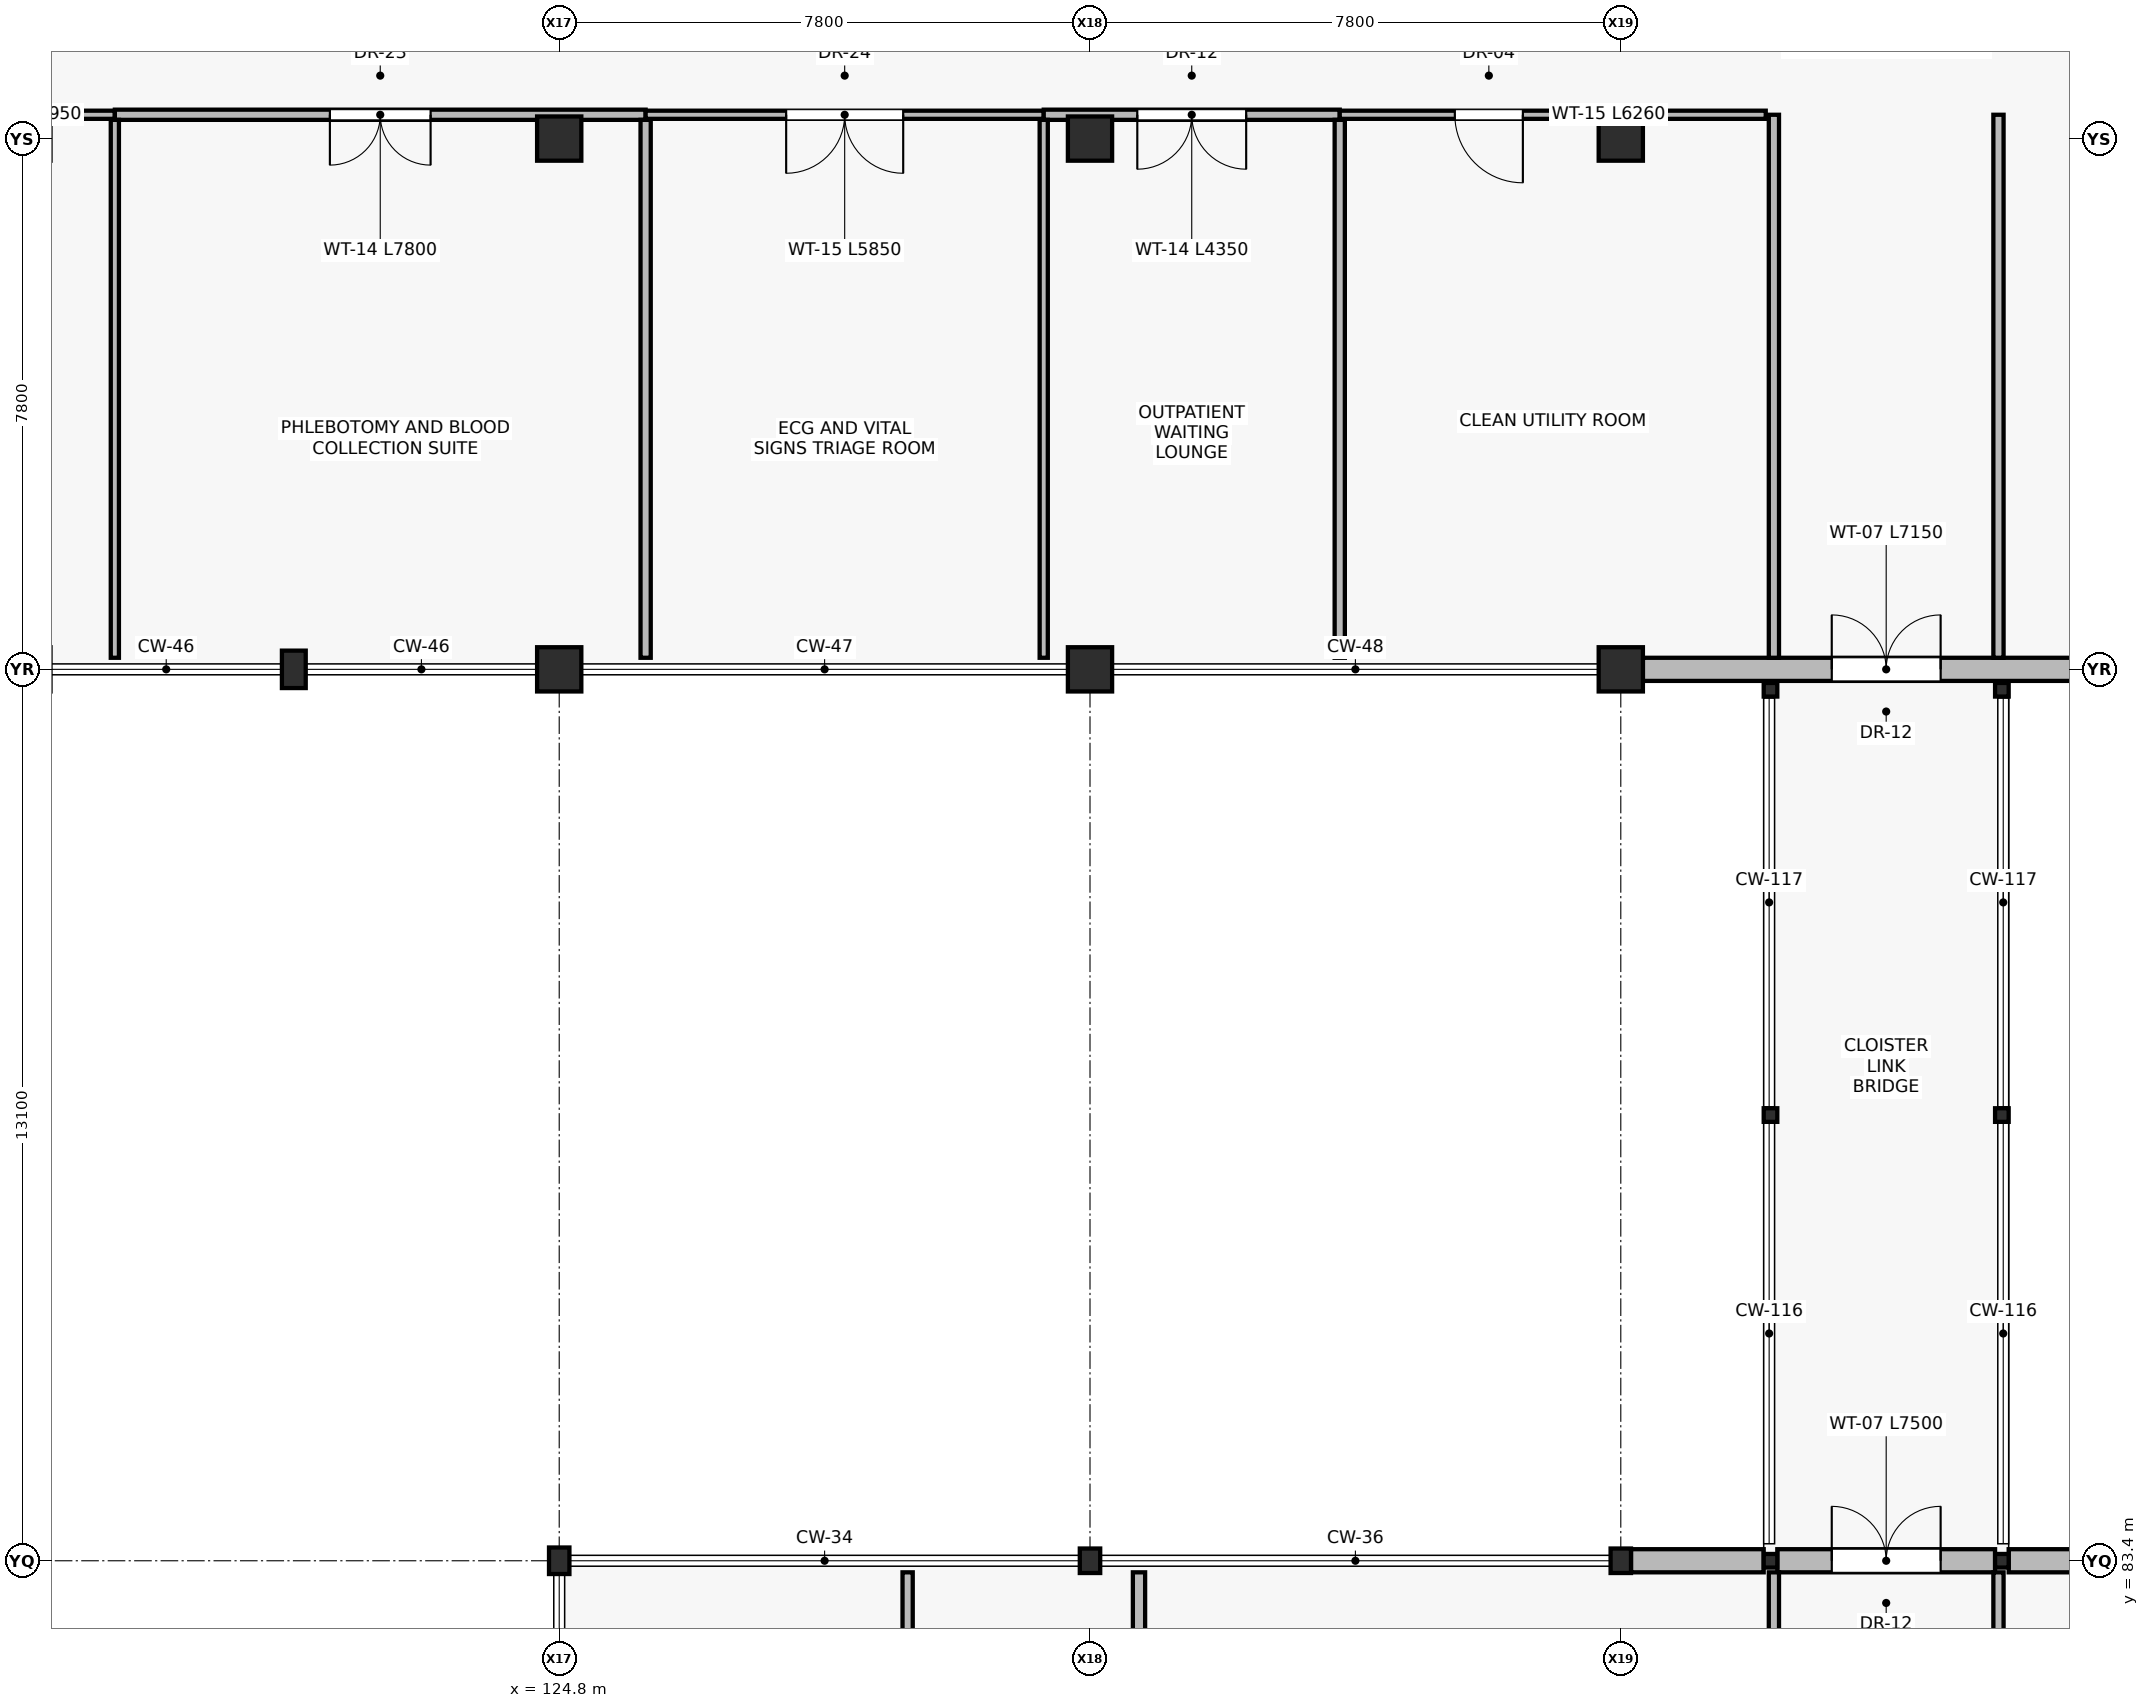
"""IFC4 building model, lengths in metres.
Left out: names, types, materials, properties, quantities, classifications, styles, units other than length and angle.
Written with IfcOpenShell. Run it as: python <this file> out.ifc"""

import sys

from ifc_helpers import new_model, si_unit, direction, frame, frame_2d, origin, origin_2d, place, context, subcontext, project, spatial, rectangle, hollow_rectangle, i_section, extrude, element, fill, save


model = new_model("IFC4")
c1 = context("Model", 3, precision=1e-05, world=origin(), true_north=direction((0.0, 1.0)))
c2 = subcontext(c1, "Body", "Model", "MODEL_VIEW")
j1 = project(units=[si_unit("LENGTHUNIT", "METRE"), si_unit("PLANEANGLEUNIT", "RADIAN")], contexts=[c1])
p1 = place(None, origin())
s1 = spatial("IfcSite", under=j1, at=p1, CompositionType="ELEMENT")
p2 = place(p1, origin())
s2 = spatial("IfcBuilding", under=s1, at=p2, CompositionType="ELEMENT")
p3 = place(p2, origin())
s3 = spatial("IfcBuildingStorey", under=s2, at=p3, CompositionType="ELEMENT", Elevation=0.0)
p4 = place(p3, frame((124.8, 83.4, 0.0), z_axis=(0.0, 0.0, 1.0), x_axis=(1.0, 0.0, 0.0)))
e1 = element("IfcColumn", 1, at=p4, inside=s3, PredefinedType="COLUMN", context=c2, shape_type="SweptSolid", body=[
    extrude(i_section(OverallWidth=0.3, OverallDepth=0.39, WebThickness=0.011, FlangeThickness=0.019, at=origin_2d()), origin(), (0.0, 0.0, 1.0), 4.8),
])
for number, where, z_axis, x_axis in (
    (2, (132.6, 83.4, 0.0), (0.0, 0.0, 1.0), (1.0, 0.0, 0.0)),
    (3, (140.4, 83.4, 0.0), (0.0, 0.0, 1.0), (1.0, 0.0, 0.0)),
):
    element("IfcColumn", number, at=place(p3, frame(where, z_axis=z_axis, x_axis=x_axis)), inside=s3, PredefinedType="COLUMN", context=c2, shape_type="SweptSolid", body=[
        extrude(i_section(OverallWidth=0.3, OverallDepth=0.36, WebThickness=0.012, FlangeThickness=0.022, at=origin_2d()), origin(), (0.0, 0.0, 1.0), 4.8),
    ])
for number, where, z_axis, x_axis in (
    (4, (124.8, 96.5, 0.0), (0.0, 0.0, 1.0), (1.0, 0.0, 0.0)),
    (5, (124.8, 104.3, 0.0), (0.0, 0.0, 1.0), (1.0, 0.0, 0.0)),
    (6, (132.6, 96.5, 0.0), (0.0, 0.0, 1.0), (1.0, 0.0, 0.0)),
    (7, (132.6, 104.3, 0.0), (0.0, 0.0, 1.0), (1.0, 0.0, 0.0)),
    (8, (140.4, 96.5, 0.0), (0.0, 0.0, 1.0), (1.0, 0.0, 0.0)),
    (9, (140.4, 104.3, 0.0), (0.0, 0.0, 1.0), (1.0, 0.0, 0.0)),
):
    element("IfcColumn", number, at=place(p3, frame(where, z_axis=z_axis, x_axis=x_axis)), inside=s3, PredefinedType="COLUMN", context=c2, shape_type="SweptSolid", body=[
        extrude(rectangle(XDim=0.65, YDim=0.65, at=origin_2d()), origin(), (0.0, 0.0, 1.0), 4.8),
    ])
for number, where, z_axis, x_axis in (
    (10, (142.6, 83.4, 0.0), (0.0, 0.0, 1.0), (1.0, 0.0, 0.0)),
    (11, (146.0, 83.4, 0.0), (0.0, 0.0, 1.0), (1.0, 0.0, 0.0)),
    (12, (142.6, 89.95, 0.0), (0.0, 0.0, 1.0), (1.0, 0.0, 0.0)),
    (13, (146.0, 89.95, 0.0), (0.0, 0.0, 1.0), (1.0, 0.0, 0.0)),
    (14, (142.6, 96.2, 0.0), (0.0, 0.0, 1.0), (1.0, 0.0, 0.0)),
    (15, (146.0, 96.2, 0.0), (0.0, 0.0, 1.0), (1.0, 0.0, 0.0)),
):
    element("IfcColumn", number, at=place(p3, frame(where, z_axis=z_axis, x_axis=x_axis)), inside=s3, PredefinedType="COLUMN", context=c2, shape_type="SweptSolid", body=[
        extrude(hollow_rectangle(XDim=0.2, YDim=0.2, WallThickness=0.01, at=origin_2d()), origin(), (0.0, 0.0, 1.0), 4.8),
    ])
p5 = place(p3, frame((120.9, 96.5, 0.0), z_axis=(0.0, 0.0, 1.0), x_axis=(1.0, 0.0, 0.0)))
e16 = element("IfcColumn", 16, at=p5, inside=s3, PredefinedType="PILASTER", context=c2, shape_type="SweptSolid", body=[
    extrude(rectangle(XDim=0.35, YDim=0.55, at=origin_2d()), origin(), (0.0, 0.0, 1.0), 4.8),
])
p6 = place(p3, frame((140.55, 83.4, 0.0), z_axis=(0.0, 0.0, 1.0), x_axis=(1.0, 0.0, 0.0)))
e17 = element("IfcWall", 17, at=p6, inside=s3, PredefinedType="STANDARD", context=c2, shape_type="SweptSolid", body=[
    extrude(rectangle(XDim=1.95, YDim=0.34, at=frame_2d((0.975, 0.0))), origin(), (0.0, 0.0, 1.0), 4.14),
])
p7 = place(p3, frame((142.7, 83.4, 0.0), z_axis=(0.0, 0.0, 1.0), x_axis=(1.0, 0.0, 0.0)))
e18 = element("IfcWall", 18, at=p7, inside=s3, PredefinedType="STANDARD", context=c2, shape_type="SweptSolid", body=[
    extrude(rectangle(XDim=3.2, YDim=0.34, at=frame_2d((1.6, 0.0))), origin(), (0.0, 0.0, 1.0), 4.14),
])
p8 = place(p7, frame((0.8, 0.0, 0.0)))
e19 = element("IfcOpeningElement", 19, at=p8, cuts=e18, PredefinedType="OPENING", context=c2, shape_type="SweptSolid", body=[
    extrude(rectangle(XDim=1.6, YDim=2.2, at=frame_2d((0.8, 1.1))), frame((0.0, 0.18, 0.0), z_axis=(0.0, -1.0, 0.0), x_axis=(1.0, 0.0, 0.0)), (0.0, 0.0, 1.0), 0.36),
])
p9 = place(p3, frame((146.1, 83.4, 0.0), z_axis=(0.0, 0.0, 1.0), x_axis=(1.0, 0.0, 0.0)))
e20 = element("IfcWall", 20, at=p9, inside=s3, PredefinedType="STANDARD", context=c2, shape_type="SweptSolid", body=[
    extrude(rectangle(XDim=1.95, YDim=0.34, at=frame_2d((0.975, 0.0))), origin(), (0.0, 0.0, 1.0), 4.14),
])
p10 = place(p3, frame((147.875, 96.5, 0.0), z_axis=(0.0, 0.0, 1.0), x_axis=(-1.0, 0.0, 0.0)))
e21 = element("IfcWall", 21, at=p10, inside=s3, PredefinedType="STANDARD", context=c2, shape_type="SweptSolid", body=[
    extrude(rectangle(XDim=7.15, YDim=0.34, at=frame_2d((3.575, 0.0))), origin(), (0.0, 0.0, 1.0), 3.385),
])
p11 = place(p10, frame((2.775, 0.0, 0.0)))
e22 = element("IfcOpeningElement", 22, at=p11, cuts=e21, PredefinedType="OPENING", context=c2, shape_type="SweptSolid", body=[
    extrude(rectangle(XDim=1.6, YDim=2.2, at=frame_2d((0.8, 1.1))), frame((0.0, 0.18, 0.0), z_axis=(0.0, -1.0, 0.0), x_axis=(1.0, 0.0, 0.0)), (0.0, 0.0, 1.0), 0.36),
])
for number, where, z_axis, x_axis in (
    (23, (142.65, 75.0, 0.0), (0.0, 0.0, 1.0), (0.0, 1.0, 0.0)),
    (24, (145.95, 75.0, 0.0), (0.0, 0.0, 1.0), (0.0, 1.0, 0.0)),
):
    element("IfcWall", number, at=place(p3, frame(where, z_axis=z_axis, x_axis=x_axis)), inside=s3, PredefinedType="PARTITIONING", context=c2, shape_type="SweptSolid", body=[
        extrude(rectangle(XDim=8.23, YDim=0.15, at=frame_2d((4.115, 0.0))), origin(), (0.0, 0.0, 1.0), 4.21),
    ])
for number, where, z_axis, x_axis in (
    (25, (142.65, 96.67, 0.0), (0.0, 0.0, 1.0), (0.0, 1.0, 0.0)),
    (26, (145.95, 96.67, 0.0), (0.0, 0.0, 1.0), (0.0, 1.0, 0.0)),
):
    element("IfcWall", number, at=place(p3, frame(where, z_axis=z_axis, x_axis=x_axis)), inside=s3, PredefinedType="PARTITIONING", context=c2, shape_type="SweptSolid", body=[
        extrude(rectangle(XDim=7.98, YDim=0.15, at=frame_2d((3.99, 0.0))), origin(), (0.0, 0.0, 1.0), 4.21),
    ])
p12 = place(p3, frame((118.27, 104.65, 0.0), z_axis=(0.0, 0.0, 1.0), x_axis=(-1.0, 0.0, 0.0)))
e27 = element("IfcWall", 27, at=p12, inside=s3, PredefinedType="PARTITIONING", context=c2, shape_type="SweptSolid", body=[
    extrude(rectangle(XDim=4.95, YDim=0.12, at=frame_2d((2.475, 0.0))), origin(), (0.0, 0.0, 1.0), 4.04),
])
p13 = place(p12, frame((2.577, 0.0, 0.0)))
e28 = element("IfcOpeningElement", 28, at=p13, cuts=e27, PredefinedType="OPENING", context=c2, shape_type="SweptSolid", body=[
    extrude(rectangle(XDim=1.28, YDim=2.25, at=frame_2d((0.64, 1.125))), frame((0.0, 0.07, 0.0), z_axis=(0.0, -1.0, 0.0), x_axis=(1.0, 0.0, 0.0)), (0.0, 0.0, 1.0), 0.14),
])
p14 = place(p3, frame((126.07, 104.65, 0.0), z_axis=(0.0, 0.0, 1.0), x_axis=(-1.0, 0.0, 0.0)))
e29 = element("IfcWall", 29, at=p14, inside=s3, PredefinedType="PARTITIONING", context=c2, shape_type="SweptSolid", body=[
    extrude(rectangle(XDim=7.8, YDim=0.15, at=frame_2d((3.9, 0.0))), origin(), (0.0, 0.0, 1.0), 4.04),
])
p15 = place(p14, frame((3.16, 0.0, 0.0)))
e30 = element("IfcOpeningElement", 30, at=p15, cuts=e29, PredefinedType="OPENING", context=c2, shape_type="SweptSolid", body=[
    extrude(rectangle(XDim=1.48, YDim=2.25, at=frame_2d((0.74, 1.125))), frame((0.0, 0.085, 0.0), z_axis=(0.0, -1.0, 0.0), x_axis=(1.0, 0.0, 0.0)), (0.0, 0.0, 1.0), 0.17),
])
p16 = place(p3, frame((131.92, 104.65, 0.0), z_axis=(0.0, 0.0, 1.0), x_axis=(-1.0, 0.0, 0.0)))
e31 = element("IfcWall", 31, at=p16, inside=s3, PredefinedType="PARTITIONING", context=c2, shape_type="SweptSolid", body=[
    extrude(rectangle(XDim=5.85, YDim=0.12, at=frame_2d((2.925, 0.0))), origin(), (0.0, 0.0, 1.0), 4.04),
])
p17 = place(p16, frame((2.065, 0.0, 0.0)))
e32 = element("IfcOpeningElement", 32, at=p17, cuts=e31, PredefinedType="OPENING", context=c2, shape_type="SweptSolid", body=[
    extrude(rectangle(XDim=1.72, YDim=2.3, at=frame_2d((0.86, 1.15))), frame((0.0, 0.07, 0.0), z_axis=(0.0, -1.0, 0.0), x_axis=(1.0, 0.0, 0.0)), (0.0, 0.0, 1.0), 0.14),
])
p18 = place(p3, frame((136.27, 104.65, 0.0), z_axis=(0.0, 0.0, 1.0), x_axis=(-1.0, 0.0, 0.0)))
e33 = element("IfcWall", 33, at=p18, inside=s3, PredefinedType="PARTITIONING", context=c2, shape_type="SweptSolid", body=[
    extrude(rectangle(XDim=4.35, YDim=0.15, at=frame_2d((2.175, 0.0))), origin(), (0.0, 0.0, 1.0), 4.04),
])
p19 = place(p18, frame((1.375, 0.0, 0.0)))
e34 = element("IfcOpeningElement", 34, at=p19, cuts=e33, PredefinedType="OPENING", context=c2, shape_type="SweptSolid", body=[
    extrude(rectangle(XDim=1.6, YDim=2.2, at=frame_2d((0.8, 1.1))), frame((0.0, 0.085, 0.0), z_axis=(0.0, -1.0, 0.0), x_axis=(1.0, 0.0, 0.0)), (0.0, 0.0, 1.0), 0.17),
])
p20 = place(p3, frame((142.53, 104.65, 0.0), z_axis=(0.0, 0.0, 1.0), x_axis=(-1.0, 0.0, 0.0)))
e35 = element("IfcWall", 35, at=p20, inside=s3, PredefinedType="PARTITIONING", context=c2, shape_type="SweptSolid", body=[
    extrude(rectangle(XDim=6.26, YDim=0.12, at=frame_2d((3.13, 0.0))), origin(), (0.0, 0.0, 1.0), 4.04),
])
p21 = place(p20, frame((3.569, 0.0, 0.0)))
e36 = element("IfcOpeningElement", 36, at=p21, cuts=e35, PredefinedType="OPENING", context=c2, shape_type="SweptSolid", body=[
    extrude(rectangle(XDim=1.0, YDim=2.1, at=frame_2d((0.5, 1.05))), frame((0.0, 0.07, 0.0), z_axis=(0.0, -1.0, 0.0), x_axis=(1.0, 0.0, 0.0)), (0.0, 0.0, 1.0), 0.14),
])
p22 = place(p3, frame((129.92, 79.76, 0.0), z_axis=(0.0, 0.0, 1.0), x_axis=(0.0, 1.0, 0.0)))
e37 = element("IfcWall", 37, at=p22, inside=s3, PredefinedType="PARTITIONING", context=c2, shape_type="SweptSolid", body=[
    extrude(rectangle(XDim=3.47, YDim=0.15, at=frame_2d((1.735, 0.0))), origin(), (0.0, 0.0, 1.0), 4.21),
])
p23 = place(p3, frame((133.32, 79.76, 0.0), z_axis=(0.0, 0.0, 1.0), x_axis=(0.0, 1.0, 0.0)))
e38 = element("IfcWall", 38, at=p23, inside=s3, PredefinedType="PARTITIONING", context=c2, shape_type="SweptSolid", body=[
    extrude(rectangle(XDim=3.47, YDim=0.18, at=frame_2d((1.735, 0.0))), origin(), (0.0, 0.0, 1.0), 4.54),
])
p24 = place(p3, frame((118.27, 96.67, 0.0), z_axis=(0.0, 0.0, 1.0), x_axis=(0.0, 1.0, 0.0)))
e39 = element("IfcWall", 39, at=p24, inside=s3, PredefinedType="PARTITIONING", context=c2, shape_type="SweptSolid", body=[
    extrude(rectangle(XDim=7.905, YDim=0.12, at=frame_2d((3.953, 0.0))), origin(), (0.0, 0.0, 1.0), 4.54),
])
p25 = place(p3, frame((126.07, 96.67, 0.0), z_axis=(0.0, 0.0, 1.0), x_axis=(0.0, 1.0, 0.0)))
e40 = element("IfcWall", 40, at=p25, inside=s3, PredefinedType="PARTITIONING", context=c2, shape_type="SweptSolid", body=[
    extrude(rectangle(XDim=7.905, YDim=0.15, at=frame_2d((3.953, 0.0))), origin(), (0.0, 0.0, 1.0), 4.54),
])
p26 = place(p3, frame((131.92, 96.67, 0.0), z_axis=(0.0, 0.0, 1.0), x_axis=(0.0, 1.0, 0.0)))
e41 = element("IfcWall", 41, at=p26, inside=s3, PredefinedType="PARTITIONING", context=c2, shape_type="SweptSolid", body=[
    extrude(rectangle(XDim=7.905, YDim=0.12, at=frame_2d((3.953, 0.0))), origin(), (0.0, 0.0, 1.0), 4.54),
])
p27 = place(p3, frame((136.27, 96.67, 0.0), z_axis=(0.0, 0.0, 1.0), x_axis=(0.0, 1.0, 0.0)))
e42 = element("IfcWall", 42, at=p27, inside=s3, PredefinedType="PARTITIONING", context=c2, shape_type="SweptSolid", body=[
    extrude(rectangle(XDim=7.905, YDim=0.15, at=frame_2d((3.953, 0.0))), origin(), (0.0, 0.0, 1.0), 4.54),
])
p28 = place(p8, origin())
e43 = element("IfcDoor", 43, at=p28, inside=s3, OperationType="DOUBLE_DOOR_SINGLE_SWING", PredefinedType="DOOR", context=c2, shape_type="SweptSolid", body=[
    extrude(rectangle(XDim=1.6, YDim=2.2, at=frame_2d((0.8, 1.1))), frame((0.0, 0.025, 0.0), z_axis=(0.0, -1.0, 0.0), x_axis=(1.0, 0.0, 0.0)), (0.0, 0.0, 1.0), 0.05),
])
fill(e19, e43)
p29 = place(p11, frame((1.6, 0.0, 0.0), z_axis=(0.0, 0.0, 1.0), x_axis=(-1.0, 0.0, 0.0)))
e44 = element("IfcDoor", 44, at=p29, inside=s3, OperationType="DOUBLE_DOOR_SINGLE_SWING", PredefinedType="DOOR", context=c2, shape_type="SweptSolid", body=[
    extrude(rectangle(XDim=1.6, YDim=2.2, at=frame_2d((0.8, 1.1))), frame((0.0, 0.025, 0.0), z_axis=(0.0, -1.0, 0.0), x_axis=(1.0, 0.0, 0.0)), (0.0, 0.0, 1.0), 0.05),
])
fill(e22, e44)
p30 = place(p15, origin())
e45 = element("IfcDoor", 45, at=p30, inside=s3, OperationType="DOUBLE_DOOR_SINGLE_SWING", PredefinedType="DOOR", context=c2, shape_type="SweptSolid", body=[
    extrude(rectangle(XDim=1.48, YDim=2.25, at=frame_2d((0.74, 1.125))), frame((0.0, 0.025, 0.0), z_axis=(0.0, -1.0, 0.0), x_axis=(1.0, 0.0, 0.0)), (0.0, 0.0, 1.0), 0.05),
])
fill(e30, e45)
p31 = place(p17, origin())
e46 = element("IfcDoor", 46, at=p31, inside=s3, OperationType="DOUBLE_DOOR_SINGLE_SWING", PredefinedType="DOOR", context=c2, shape_type="SweptSolid", body=[
    extrude(rectangle(XDim=1.72, YDim=2.3, at=frame_2d((0.86, 1.15))), frame((0.0, 0.025, 0.0), z_axis=(0.0, -1.0, 0.0), x_axis=(1.0, 0.0, 0.0)), (0.0, 0.0, 1.0), 0.05),
])
fill(e32, e46)
p32 = place(p19, origin())
e47 = element("IfcDoor", 47, at=p32, inside=s3, OperationType="DOUBLE_DOOR_SINGLE_SWING", PredefinedType="DOOR", context=c2, shape_type="SweptSolid", body=[
    extrude(rectangle(XDim=1.6, YDim=2.2, at=frame_2d((0.8, 1.1))), frame((0.0, 0.025, 0.0), z_axis=(0.0, -1.0, 0.0), x_axis=(1.0, 0.0, 0.0)), (0.0, 0.0, 1.0), 0.05),
])
fill(e34, e47)
p33 = place(p21, origin())
e48 = element("IfcDoor", 48, at=p33, inside=s3, OperationType="SINGLE_SWING_LEFT", PredefinedType="DOOR", context=c2, shape_type="SweptSolid", body=[
    extrude(rectangle(XDim=1.0, YDim=2.1, at=frame_2d((0.5, 1.05))), frame((0.0, 0.025, 0.0), z_axis=(0.0, -1.0, 0.0), x_axis=(1.0, 0.0, 0.0)), (0.0, 0.0, 1.0), 0.05),
])
fill(e36, e48)
save(model, sys.argv[1])
